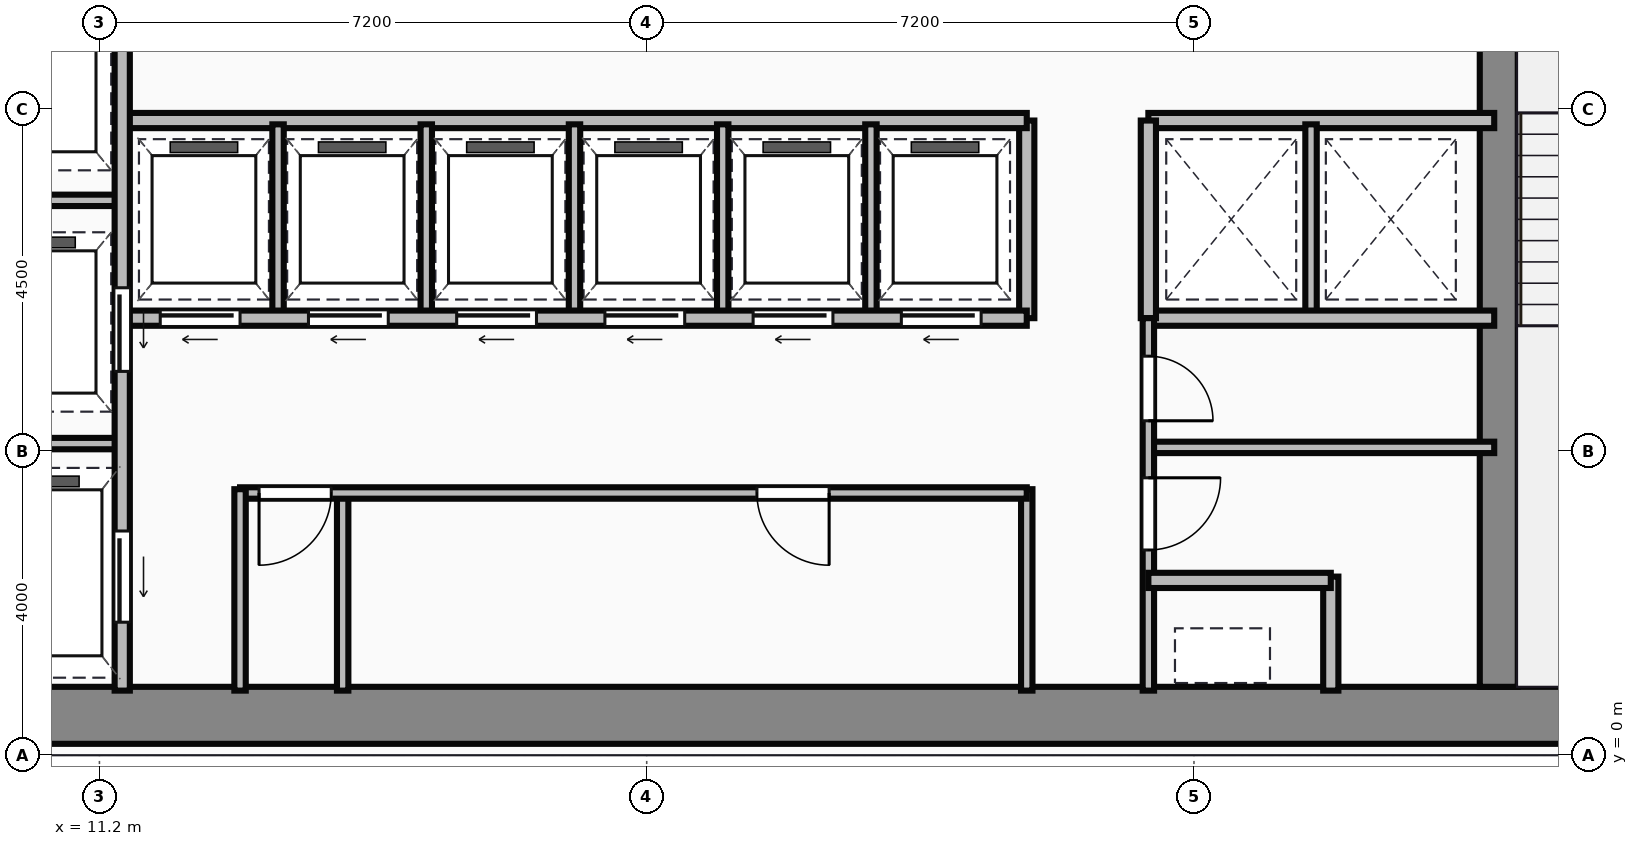
"""IFC4 building model, lengths in metres.
Left out: names, types, materials, properties, quantities, classifications, styles, units other than length and angle.
Written with IfcOpenShell. Run it as: python <this file> out.ifc"""

import sys

from ifc_helpers import new_model, si_unit, direction, frame, frame_2d, origin, place, context, subcontext, project, spatial, rectangle, extrude, source, transform, mapped, element, fill, save


model = new_model("IFC4")
c1 = context("Model", 3, precision=1e-05, world=origin(), true_north=direction((0.0, 1.0)))
c2 = subcontext(c1, "Body", "Model", "MODEL_VIEW")
j1 = project(units=[si_unit("LENGTHUNIT", "METRE"), si_unit("PLANEANGLEUNIT", "RADIAN")], contexts=[c1])
p1 = place(None, origin())
s1 = spatial("IfcSite", under=j1, at=p1, CompositionType="ELEMENT")
p2 = place(p1, origin())
s2 = spatial("IfcBuilding", under=s1, at=p2, CompositionType="ELEMENT")
p3 = place(p2, frame((0.0, 0.0, 180.75)))
s3 = spatial("IfcBuildingStorey", under=s2, at=p3, CompositionType="ELEMENT", Elevation=180.75)
m1 = source(origin(), c2, "Body", "SweptSolid", [
    extrude(rectangle(XDim=29.5, YDim=0.75, at=frame_2d((14.75, 0.0))), origin(), (0.0, 0.0, 1.0), 3.65),
])
p4 = place(p3, frame((4.5, 0.525, 0.0), z_axis=(0.0, 0.0, 1.0), x_axis=(1.0, 0.0, 0.0)))
e1 = element("IfcWall", 1, at=p4, inside=s3, PredefinedType="SHEAR", context=c2, shape_type="MappedRepresentation", body=[
    mapped(m1, transform((0.0, 0.0, 0.0))),
])
m2 = source(origin(), c2, "Body", "SweptSolid", [
    extrude(rectangle(XDim=12.35, YDim=0.5, at=frame_2d((6.175, 0.0))), origin(), (0.0, 0.0, 1.0), 3.65),
])
p5 = place(p3, frame((29.61, 0.9, 0.0), z_axis=(0.0, 0.0, 1.0), x_axis=(0.0, 1.0, 0.0)))
e2 = element("IfcWall", 2, at=p5, inside=s3, PredefinedType="SHEAR", context=c2, shape_type="MappedRepresentation", body=[
    mapped(m2, transform((0.0, 0.0, 0.0))),
])
m3 = source(origin(), c2, "Body", "SweptSolid", [
    extrude(rectangle(XDim=9.6, YDim=0.2, at=frame_2d((4.8, 0.0))), origin(), (0.0, 0.0, 1.0), 3.4),
])
p6 = place(p3, frame((11.5, 0.85, 0.0), z_axis=(0.0, 0.0, 1.0), x_axis=(0.0, 1.0, 0.0)))
e3 = element("IfcWall", 3, at=p6, inside=s3, PredefinedType="PARTITIONING", context=c2, shape_type="MappedRepresentation", body=[
    mapped(m3, transform((0.0, 0.0, 0.0))),
])
p7 = place(p6, frame((4.2, 0.0, 0.0)))
e4 = element("IfcOpeningElement", 4, at=p7, cuts=e3, PredefinedType="OPENING", context=c2, shape_type="SweptSolid", body=[
    extrude(rectangle(XDim=1.1, YDim=2.15, at=frame_2d((0.55, 1.075))), frame((0.0, 0.11, 0.0), z_axis=(0.0, -1.0, 0.0), x_axis=(1.0, 0.0, 0.0)), (0.0, 0.0, 1.0), 0.22),
])
p8 = place(p6, frame((0.9, 0.0, 0.0)))
e5 = element("IfcOpeningElement", 5, at=p8, cuts=e3, PredefinedType="OPENING", context=c2, shape_type="SweptSolid", body=[
    extrude(rectangle(XDim=1.2, YDim=2.15, at=frame_2d((0.6, 1.075))), frame((0.0, 0.11, 0.0), z_axis=(0.0, -1.0, 0.0), x_axis=(1.0, 0.0, 0.0)), (0.0, 0.0, 1.0), 0.22),
])
m4 = source(origin(), c2, "Body", "SweptSolid", [
    extrude(rectangle(XDim=2.4, YDim=0.15, at=frame_2d((1.2, 0.0))), origin(), (0.0, 0.0, 1.0), 3.4),
])
for number, where, z_axis, x_axis in (
    (6, (9.1, 4.1, 0.0), (0.0, 0.0, 1.0), (1.0, 0.0, 0.0)),
    (7, (9.1, 7.3, 0.0), (0.0, 0.0, 1.0), (1.0, 0.0, 0.0)),
):
    element("IfcWall", number, at=place(p3, frame(where, z_axis=z_axis, x_axis=x_axis)), inside=s3, PredefinedType="PARTITIONING", context=c2, shape_type="MappedRepresentation", body=[
        mapped(m4, transform((0.0, 0.0, 0.0))),
    ])
m5 = source(origin(), c2, "Body", "SweptSolid", [
    extrude(rectangle(XDim=2.65, YDim=0.15, at=frame_2d((1.325, 0.0))), origin(), (0.0, 0.0, 1.0), 3.4),
])
p9 = place(p3, frame((13.05, 0.85, 0.0), z_axis=(0.0, 0.0, 1.0), x_axis=(0.0, 1.0, 0.0)))
e8 = element("IfcWall", 8, at=p9, inside=s3, PredefinedType="PARTITIONING", context=c2, shape_type="MappedRepresentation", body=[
    mapped(m5, transform((0.0, 0.0, 0.0))),
])
m6 = source(origin(), c2, "Body", "SweptSolid", [
    extrude(rectangle(XDim=10.35, YDim=0.15, at=frame_2d((5.175, 0.0))), origin(), (0.0, 0.0, 1.0), 3.4),
])
p10 = place(p3, frame((13.05, 3.45, 0.0), z_axis=(0.0, 0.0, 1.0), x_axis=(1.0, 0.0, 0.0)))
e9 = element("IfcWall", 9, at=p10, inside=s3, PredefinedType="PARTITIONING", context=c2, shape_type="MappedRepresentation", body=[
    mapped(m6, transform((0.0, 0.0, 0.0))),
])
p11 = place(p10, frame((0.25, 0.0, 0.0)))
e10 = element("IfcOpeningElement", 10, at=p11, cuts=e9, PredefinedType="OPENING", context=c2, shape_type="SweptSolid", body=[
    extrude(rectangle(XDim=0.95, YDim=2.15, at=frame_2d((0.475, 1.075))), frame((0.0, 0.085, 0.0), z_axis=(0.0, -1.0, 0.0), x_axis=(1.0, 0.0, 0.0)), (0.0, 0.0, 1.0), 0.17),
])
p12 = place(p10, frame((6.8, 0.0, 0.0)))
e11 = element("IfcOpeningElement", 11, at=p12, cuts=e9, PredefinedType="OPENING", context=c2, shape_type="SweptSolid", body=[
    extrude(rectangle(XDim=0.95, YDim=2.15, at=frame_2d((0.475, 1.075))), frame((0.0, 0.085, 0.0), z_axis=(0.0, -1.0, 0.0), x_axis=(1.0, 0.0, 0.0)), (0.0, 0.0, 1.0), 0.17),
])
p13 = place(p3, frame((23.4, 0.85, 0.0), z_axis=(0.0, 0.0, 1.0), x_axis=(0.0, 1.0, 0.0)))
e12 = element("IfcWall", 12, at=p13, inside=s3, PredefinedType="PARTITIONING", context=c2, shape_type="MappedRepresentation", body=[
    mapped(m5, transform((0.0, 0.0, 0.0))),
])
m7 = source(origin(), c2, "Body", "SweptSolid", [
    extrude(rectangle(XDim=2.6, YDim=0.15, at=frame_2d((1.3, 0.0))), origin(), (0.0, 0.0, 1.0), 3.4),
])
p14 = place(p3, frame((14.4, 0.85, 0.0), z_axis=(0.0, 0.0, 1.0), x_axis=(0.0, 1.0, 0.0)))
e13 = element("IfcWall", 13, at=p14, inside=s3, PredefinedType="PARTITIONING", context=c2, shape_type="MappedRepresentation", body=[
    mapped(m7, transform((0.0, 0.0, 0.0))),
])
m8 = source(origin(), c2, "Body", "SweptSolid", [
    extrude(rectangle(XDim=11.85, YDim=0.2, at=frame_2d((5.925, 0.0))), origin(), (0.0, 0.0, 1.0), 3.4),
])
p15 = place(p3, frame((11.55, 5.75, 0.0), z_axis=(0.0, 0.0, 1.0), x_axis=(1.0, 0.0, 0.0)))
e14 = element("IfcWall", 14, at=p15, inside=s3, PredefinedType="PARTITIONING", context=c2, shape_type="MappedRepresentation", body=[
    mapped(m8, transform((0.0, 0.0, 0.0))),
])
p16 = place(p15, frame((0.45, 0.0, 0.0)))
e15 = element("IfcOpeningElement", 15, at=p16, cuts=e14, PredefinedType="OPENING", context=c2, shape_type="SweptSolid", body=[
    extrude(rectangle(XDim=1.05, YDim=2.15, at=frame_2d((0.525, 1.075))), frame((0.0, 0.11, 0.0), z_axis=(0.0, -1.0, 0.0), x_axis=(1.0, 0.0, 0.0)), (0.0, 0.0, 1.0), 0.22),
])
p17 = place(p15, frame((2.4, 0.0, 0.0)))
e16 = element("IfcOpeningElement", 16, at=p17, cuts=e14, PredefinedType="OPENING", context=c2, shape_type="SweptSolid", body=[
    extrude(rectangle(XDim=1.05, YDim=2.15, at=frame_2d((0.525, 1.075))), frame((0.0, 0.11, 0.0), z_axis=(0.0, -1.0, 0.0), x_axis=(1.0, 0.0, 0.0)), (0.0, 0.0, 1.0), 0.22),
])
p18 = place(p15, frame((4.35, 0.0, 0.0)))
e17 = element("IfcOpeningElement", 17, at=p18, cuts=e14, PredefinedType="OPENING", context=c2, shape_type="SweptSolid", body=[
    extrude(rectangle(XDim=1.05, YDim=2.15, at=frame_2d((0.525, 1.075))), frame((0.0, 0.11, 0.0), z_axis=(0.0, -1.0, 0.0), x_axis=(1.0, 0.0, 0.0)), (0.0, 0.0, 1.0), 0.22),
])
p19 = place(p15, frame((6.3, 0.0, 0.0)))
e18 = element("IfcOpeningElement", 18, at=p19, cuts=e14, PredefinedType="OPENING", context=c2, shape_type="SweptSolid", body=[
    extrude(rectangle(XDim=1.05, YDim=2.15, at=frame_2d((0.525, 1.075))), frame((0.0, 0.11, 0.0), z_axis=(0.0, -1.0, 0.0), x_axis=(1.0, 0.0, 0.0)), (0.0, 0.0, 1.0), 0.22),
])
p20 = place(p15, frame((8.25, 0.0, 0.0)))
e19 = element("IfcOpeningElement", 19, at=p20, cuts=e14, PredefinedType="OPENING", context=c2, shape_type="SweptSolid", body=[
    extrude(rectangle(XDim=1.05, YDim=2.15, at=frame_2d((0.525, 1.075))), frame((0.0, 0.11, 0.0), z_axis=(0.0, -1.0, 0.0), x_axis=(1.0, 0.0, 0.0)), (0.0, 0.0, 1.0), 0.22),
])
p21 = place(p15, frame((10.2, 0.0, 0.0)))
e20 = element("IfcOpeningElement", 20, at=p21, cuts=e14, PredefinedType="OPENING", context=c2, shape_type="SweptSolid", body=[
    extrude(rectangle(XDim=1.05, YDim=2.15, at=frame_2d((0.525, 1.075))), frame((0.0, 0.11, 0.0), z_axis=(0.0, -1.0, 0.0), x_axis=(1.0, 0.0, 0.0)), (0.0, 0.0, 1.0), 0.22),
])
p22 = place(p3, frame((11.55, 8.35, 0.0), z_axis=(0.0, 0.0, 1.0), x_axis=(1.0, 0.0, 0.0)))
e21 = element("IfcWall", 21, at=p22, inside=s3, PredefinedType="PARTITIONING", context=c2, shape_type="MappedRepresentation", body=[
    mapped(m8, transform((0.0, 0.0, 0.0))),
])
m9 = source(origin(), c2, "Body", "SweptSolid", [
    extrude(rectangle(XDim=2.6, YDim=0.2, at=frame_2d((1.3, 0.0))), origin(), (0.0, 0.0, 1.0), 3.4),
])
p23 = place(p3, frame((23.4, 5.75, 0.0), z_axis=(0.0, 0.0, 1.0), x_axis=(0.0, 1.0, 0.0)))
e22 = element("IfcWall", 22, at=p23, inside=s3, PredefinedType="PARTITIONING", context=c2, shape_type="MappedRepresentation", body=[
    mapped(m9, transform((0.0, 0.0, 0.0))),
])
m10 = source(origin(), c2, "Body", "SweptSolid", [
    extrude(rectangle(XDim=2.5, YDim=0.15, at=frame_2d((1.25, 0.0))), origin(), (0.0, 0.0, 1.0), 3.4),
])
for number, where, z_axis, x_axis in (
    (23, (13.55, 5.8, 0.0), (0.0, 0.0, 1.0), (0.0, 1.0, 0.0)),
    (24, (15.5, 5.8, 0.0), (0.0, 0.0, 1.0), (0.0, 1.0, 0.0)),
    (25, (17.45, 5.8, 0.0), (0.0, 0.0, 1.0), (0.0, 1.0, 0.0)),
    (26, (19.4, 5.8, 0.0), (0.0, 0.0, 1.0), (0.0, 1.0, 0.0)),
    (27, (21.35, 5.8, 0.0), (0.0, 0.0, 1.0), (0.0, 1.0, 0.0)),
):
    element("IfcWall", number, at=place(p3, frame(where, z_axis=z_axis, x_axis=x_axis)), inside=s3, PredefinedType="PARTITIONING", context=c2, shape_type="MappedRepresentation", body=[
        mapped(m10, transform((0.0, 0.0, 0.0))),
    ])
m11 = source(origin(), c2, "Body", "SweptSolid", [
    extrude(rectangle(XDim=4.55, YDim=0.2, at=frame_2d((2.275, 0.0))), origin(), (0.0, 0.0, 1.0), 3.4),
])
for number, where, z_axis, x_axis in (
    (28, (25.0, 8.35, 0.0), (0.0, 0.0, 1.0), (1.0, 0.0, 0.0)),
    (29, (25.0, 5.75, 0.0), (0.0, 0.0, 1.0), (1.0, 0.0, 0.0)),
):
    element("IfcWall", number, at=place(p3, frame(where, z_axis=z_axis, x_axis=x_axis)), inside=s3, PredefinedType="PARTITIONING", context=c2, shape_type="MappedRepresentation", body=[
        mapped(m11, transform((0.0, 0.0, 0.0))),
    ])
p24 = place(p3, frame((25.0, 5.75, 0.0), z_axis=(0.0, 0.0, 1.0), x_axis=(0.0, 1.0, 0.0)))
e30 = element("IfcWall", 30, at=p24, inside=s3, PredefinedType="PARTITIONING", context=c2, shape_type="MappedRepresentation", body=[
    mapped(m9, transform((0.0, 0.0, 0.0))),
])
p25 = place(p3, frame((27.14, 5.8, 0.0), z_axis=(0.0, 0.0, 1.0), x_axis=(0.0, 1.0, 0.0)))
e31 = element("IfcWall", 31, at=p25, inside=s3, PredefinedType="PARTITIONING", context=c2, shape_type="MappedRepresentation", body=[
    mapped(m10, transform((0.0, 0.0, 0.0))),
])
m12 = source(origin(), c2, "Body", "SweptSolid", [
    extrude(rectangle(XDim=4.9, YDim=0.15, at=frame_2d((2.45, 0.0))), origin(), (0.0, 0.0, 1.0), 3.4),
])
p26 = place(p3, frame((25.0, 0.85, 0.0), z_axis=(0.0, 0.0, 1.0), x_axis=(0.0, 1.0, 0.0)))
e32 = element("IfcWall", 32, at=p26, inside=s3, PredefinedType="PARTITIONING", context=c2, shape_type="MappedRepresentation", body=[
    mapped(m12, transform((0.0, 0.0, 0.0))),
])
p27 = place(p26, frame((1.85, 0.0, 0.0)))
e33 = element("IfcOpeningElement", 33, at=p27, cuts=e32, PredefinedType="OPENING", context=c2, shape_type="SweptSolid", body=[
    extrude(rectangle(XDim=0.95, YDim=2.15, at=frame_2d((0.475, 1.075))), frame((0.0, 0.085, 0.0), z_axis=(0.0, -1.0, 0.0), x_axis=(1.0, 0.0, 0.0)), (0.0, 0.0, 1.0), 0.17),
])
p28 = place(p26, frame((3.55, 0.0, 0.0)))
e34 = element("IfcOpeningElement", 34, at=p28, cuts=e32, PredefinedType="OPENING", context=c2, shape_type="SweptSolid", body=[
    extrude(rectangle(XDim=0.85, YDim=2.15, at=frame_2d((0.425, 1.075))), frame((0.0, 0.085, 0.0), z_axis=(0.0, -1.0, 0.0), x_axis=(1.0, 0.0, 0.0)), (0.0, 0.0, 1.0), 0.17),
])
m13 = source(origin(), c2, "Body", "SweptSolid", [
    extrude(rectangle(XDim=2.4, YDim=0.2, at=frame_2d((1.2, 0.0))), origin(), (0.0, 0.0, 1.0), 3.4),
])
p29 = place(p3, frame((25.0, 2.3, 0.0), z_axis=(0.0, 0.0, 1.0), x_axis=(1.0, 0.0, 0.0)))
e35 = element("IfcWall", 35, at=p29, inside=s3, PredefinedType="PARTITIONING", context=c2, shape_type="MappedRepresentation", body=[
    mapped(m13, transform((0.0, 0.0, 0.0))),
])
m14 = source(origin(), c2, "Body", "SweptSolid", [
    extrude(rectangle(XDim=1.5, YDim=0.2, at=frame_2d((0.75, 0.0))), origin(), (0.0, 0.0, 1.0), 3.4),
])
p30 = place(p3, frame((27.4, 0.85, 0.0), z_axis=(0.0, 0.0, 1.0), x_axis=(0.0, 1.0, 0.0)))
e36 = element("IfcWall", 36, at=p30, inside=s3, PredefinedType="PARTITIONING", context=c2, shape_type="MappedRepresentation", body=[
    mapped(m14, transform((0.0, 0.0, 0.0))),
])
m15 = source(origin(), c2, "Body", "SweptSolid", [
    extrude(rectangle(XDim=4.55, YDim=0.15, at=frame_2d((2.275, 0.0))), origin(), (0.0, 0.0, 1.0), 3.4),
])
p31 = place(p3, frame((25.0, 4.05, 0.0), z_axis=(0.0, 0.0, 1.0), x_axis=(1.0, 0.0, 0.0)))
e37 = element("IfcWall", 37, at=p31, inside=s3, PredefinedType="PARTITIONING", context=c2, shape_type="MappedRepresentation", body=[
    mapped(m15, transform((0.0, 0.0, 0.0))),
])
m16 = source(origin(), c2, "Body", "SweptSolid", [
    extrude(rectangle(XDim=1.1, YDim=2.15, at=frame_2d((0.55, 1.075))), frame((0.0, 0.025, 0.0), z_axis=(0.0, -1.0, 0.0), x_axis=(1.0, 0.0, 0.0)), (0.0, 0.0, 1.0), 0.05),
])
p32 = place(p7, frame((1.1, 0.0, 0.0), z_axis=(0.0, 0.0, 1.0), x_axis=(-1.0, 0.0, 0.0)))
e38 = element("IfcDoor", 38, at=p32, inside=s3, OperationType="SLIDING_TO_LEFT", PredefinedType="DOOR", context=c2, shape_type="MappedRepresentation", body=[
    mapped(m16, transform((0.0, 0.0, 0.0))),
])
fill(e4, e38)
m17 = source(origin(), c2, "Body", "SweptSolid", [
    extrude(rectangle(XDim=1.2, YDim=2.15, at=frame_2d((0.6, 1.075))), frame((0.0, 0.025, 0.0), z_axis=(0.0, -1.0, 0.0), x_axis=(1.0, 0.0, 0.0)), (0.0, 0.0, 1.0), 0.05),
])
p33 = place(p8, frame((1.2, 0.0, 0.0), z_axis=(0.0, 0.0, 1.0), x_axis=(-1.0, 0.0, 0.0)))
e39 = element("IfcDoor", 39, at=p33, inside=s3, OperationType="SLIDING_TO_LEFT", PredefinedType="DOOR", context=c2, shape_type="MappedRepresentation", body=[
    mapped(m17, transform((0.0, 0.0, 0.0))),
])
fill(e5, e39)
m18 = source(origin(), c2, "Body", "SweptSolid", [
    extrude(rectangle(XDim=0.95, YDim=2.15, at=frame_2d((0.475, 1.075))), frame((0.0, 0.025, 0.0), z_axis=(0.0, -1.0, 0.0), x_axis=(1.0, 0.0, 0.0)), (0.0, 0.0, 1.0), 0.05),
])
p34 = place(p11, origin())
e40 = element("IfcDoor", 40, at=p34, inside=s3, OperationType="SINGLE_SWING_LEFT", PredefinedType="DOOR", context=c2, shape_type="MappedRepresentation", body=[
    mapped(m18, transform((0.0, 0.0, 0.0))),
])
fill(e10, e40)
p35 = place(p12, origin())
e41 = element("IfcDoor", 41, at=p35, inside=s3, OperationType="SINGLE_SWING_RIGHT", PredefinedType="DOOR", context=c2, shape_type="MappedRepresentation", body=[
    mapped(m18, transform((0.0, 0.0, 0.0))),
])
fill(e11, e41)
m19 = source(origin(), c2, "Body", "SweptSolid", [
    extrude(rectangle(XDim=1.05, YDim=2.15, at=frame_2d((0.525, 1.075))), frame((0.0, 0.025, 0.0), z_axis=(0.0, -1.0, 0.0), x_axis=(1.0, 0.0, 0.0)), (0.0, 0.0, 1.0), 0.05),
])
p36 = place(p16, frame((1.05, 0.0, 0.0), z_axis=(0.0, 0.0, 1.0), x_axis=(-1.0, 0.0, 0.0)))
e42 = element("IfcDoor", 42, at=p36, inside=s3, OperationType="SLIDING_TO_LEFT", PredefinedType="DOOR", context=c2, shape_type="MappedRepresentation", body=[
    mapped(m19, transform((0.0, 0.0, 0.0))),
])
fill(e15, e42)
p37 = place(p17, frame((1.05, 0.0, 0.0), z_axis=(0.0, 0.0, 1.0), x_axis=(-1.0, 0.0, 0.0)))
e43 = element("IfcDoor", 43, at=p37, inside=s3, OperationType="SLIDING_TO_LEFT", PredefinedType="DOOR", context=c2, shape_type="MappedRepresentation", body=[
    mapped(m19, transform((0.0, 0.0, 0.0))),
])
fill(e16, e43)
p38 = place(p18, frame((1.05, 0.0, 0.0), z_axis=(0.0, 0.0, 1.0), x_axis=(-1.0, 0.0, 0.0)))
e44 = element("IfcDoor", 44, at=p38, inside=s3, OperationType="SLIDING_TO_LEFT", PredefinedType="DOOR", context=c2, shape_type="MappedRepresentation", body=[
    mapped(m19, transform((0.0, 0.0, 0.0))),
])
fill(e17, e44)
p39 = place(p19, frame((1.05, 0.0, 0.0), z_axis=(0.0, 0.0, 1.0), x_axis=(-1.0, 0.0, 0.0)))
e45 = element("IfcDoor", 45, at=p39, inside=s3, OperationType="SLIDING_TO_LEFT", PredefinedType="DOOR", context=c2, shape_type="MappedRepresentation", body=[
    mapped(m19, transform((0.0, 0.0, 0.0))),
])
fill(e18, e45)
p40 = place(p20, frame((1.05, 0.0, 0.0), z_axis=(0.0, 0.0, 1.0), x_axis=(-1.0, 0.0, 0.0)))
e46 = element("IfcDoor", 46, at=p40, inside=s3, OperationType="SLIDING_TO_LEFT", PredefinedType="DOOR", context=c2, shape_type="MappedRepresentation", body=[
    mapped(m19, transform((0.0, 0.0, 0.0))),
])
fill(e19, e46)
p41 = place(p21, frame((1.05, 0.0, 0.0), z_axis=(0.0, 0.0, 1.0), x_axis=(-1.0, 0.0, 0.0)))
e47 = element("IfcDoor", 47, at=p41, inside=s3, OperationType="SLIDING_TO_LEFT", PredefinedType="DOOR", context=c2, shape_type="MappedRepresentation", body=[
    mapped(m19, transform((0.0, 0.0, 0.0))),
])
fill(e20, e47)
p42 = place(p27, origin())
e48 = element("IfcDoor", 48, at=p42, inside=s3, OperationType="SINGLE_SWING_RIGHT", PredefinedType="DOOR", context=c2, shape_type="MappedRepresentation", body=[
    mapped(m18, transform((0.0, 0.0, 0.0))),
])
fill(e33, e48)
m20 = source(origin(), c2, "Body", "SweptSolid", [
    extrude(rectangle(XDim=0.85, YDim=2.15, at=frame_2d((0.425, 1.075))), frame((0.0, 0.025, 0.0), z_axis=(0.0, -1.0, 0.0), x_axis=(1.0, 0.0, 0.0)), (0.0, 0.0, 1.0), 0.05),
])
p43 = place(p28, origin())
e49 = element("IfcDoor", 49, at=p43, inside=s3, OperationType="SINGLE_SWING_LEFT", PredefinedType="DOOR", context=c2, shape_type="MappedRepresentation", body=[
    mapped(m20, transform((0.0, 0.0, 0.0))),
])
fill(e34, e49)
save(model, sys.argv[1])
